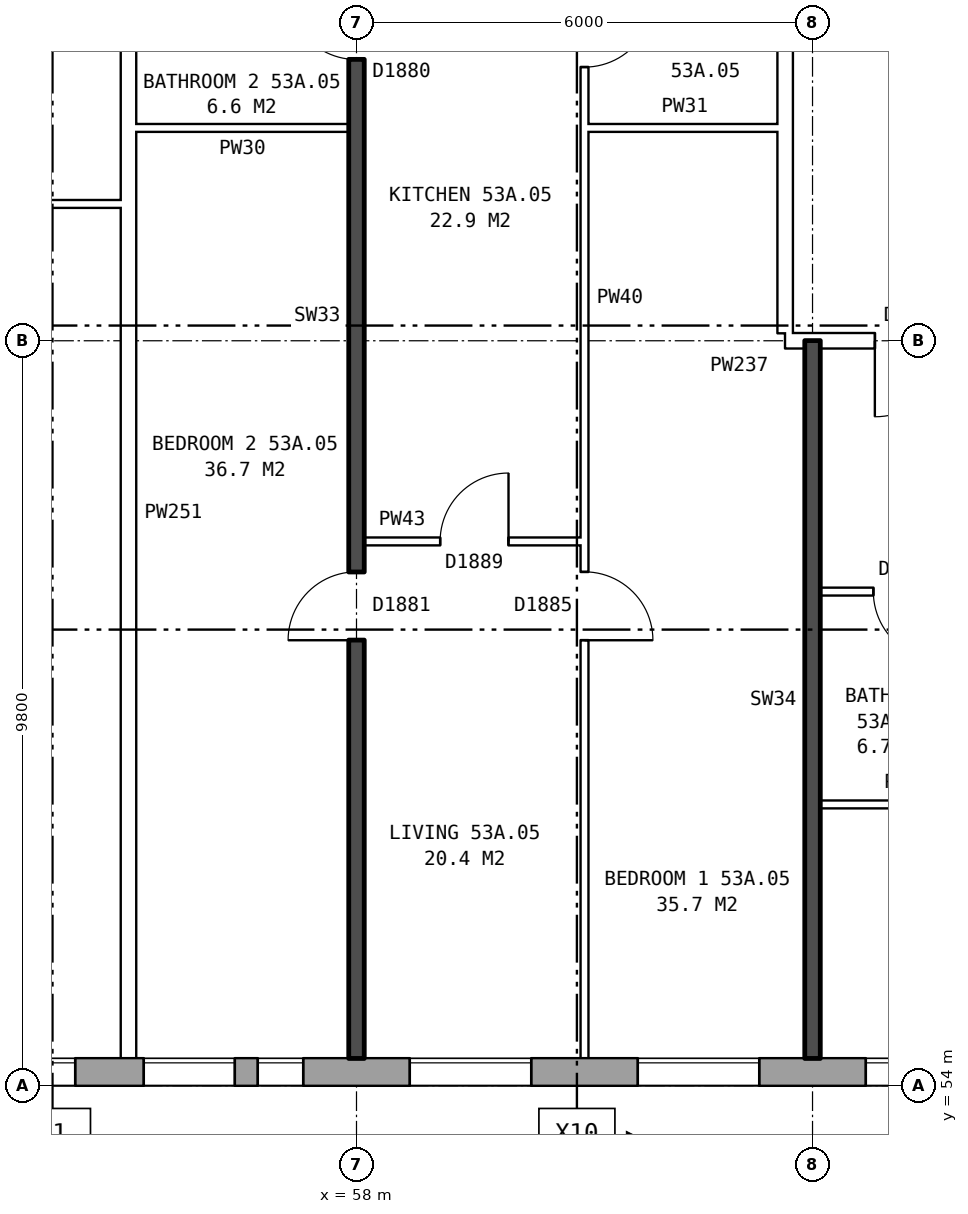
"""IFC4 building model, lengths in metres.
Left out: names, types, materials, properties, quantities, classifications, styles, units other than length and angle.
Written with IfcOpenShell. Run it as: python <this file> out.ifc"""

import sys

from ifc_helpers import new_model, si_unit, direction, frame, frame_2d, origin, place, context, subcontext, project, spatial, rectangle, extrude, element, fill, save


model = new_model("IFC4")
c1 = context("Model", 3, precision=1e-05, world=origin(), true_north=direction((0.0, 1.0)))
c2 = subcontext(c1, "Body", "Model", "MODEL_VIEW")
j1 = project(units=[si_unit("LENGTHUNIT", "METRE"), si_unit("PLANEANGLEUNIT", "RADIAN")], contexts=[c1])
p1 = place(None, origin())
s1 = spatial("IfcSite", under=j1, at=p1, CompositionType="ELEMENT")
p2 = place(p1, origin())
s2 = spatial("IfcBuilding", under=s1, at=p2, CompositionType="ELEMENT")
p3 = place(p2, frame((0.0, 0.0, 188.2)))
s3 = spatial("IfcBuildingStorey", under=s2, at=p3, CompositionType="ELEMENT", Elevation=188.2)
p4 = place(p3, frame((33.325, 54.18, 0.0), z_axis=(0.0, 0.0, 1.0), x_axis=(1.0, 0.0, 0.0)))
e1 = element("IfcWall", 1, at=p4, inside=s3, PredefinedType="STANDARD", context=c2, shape_type="SweptSolid", body=[
    extrude(rectangle(XDim=39.601, YDim=0.36, at=frame_2d((19.8, 0.0))), origin(), (0.0, 0.0, 1.0), 2.85),
])
p5 = place(p4, frame((1.375, 0.0, 0.8)))
e2 = element("IfcOpeningElement", 2, at=p5, cuts=e1, PredefinedType="OPENING", context=c2, shape_type="SweptSolid", body=[
    extrude(rectangle(XDim=1.6, YDim=1.8, at=frame_2d((0.8, 0.9))), frame((0.0, 0.19, 0.0), z_axis=(0.0, -1.0, 0.0), x_axis=(1.0, 0.0, 0.0)), (0.0, 0.0, 1.0), 0.38),
])
p6 = place(p4, frame((4.375, 0.0, 0.8)))
e3 = element("IfcOpeningElement", 3, at=p6, cuts=e1, PredefinedType="OPENING", context=c2, shape_type="SweptSolid", body=[
    extrude(rectangle(XDim=1.6, YDim=1.8, at=frame_2d((0.8, 0.9))), frame((0.0, 0.19, 0.0), z_axis=(0.0, -1.0, 0.0), x_axis=(1.0, 0.0, 0.0)), (0.0, 0.0, 1.0), 0.38),
])
p7 = place(p4, frame((7.375, 0.0, 0.8)))
e4 = element("IfcOpeningElement", 4, at=p7, cuts=e1, PredefinedType="OPENING", context=c2, shape_type="SweptSolid", body=[
    extrude(rectangle(XDim=1.6, YDim=1.8, at=frame_2d((0.8, 0.9))), frame((0.0, 0.19, 0.0), z_axis=(0.0, -1.0, 0.0), x_axis=(1.0, 0.0, 0.0)), (0.0, 0.0, 1.0), 0.38),
])
p8 = place(p4, frame((10.375, 0.0, 0.8)))
e5 = element("IfcOpeningElement", 5, at=p8, cuts=e1, PredefinedType="OPENING", context=c2, shape_type="SweptSolid", body=[
    extrude(rectangle(XDim=1.6, YDim=1.8, at=frame_2d((0.8, 0.9))), frame((0.0, 0.19, 0.0), z_axis=(0.0, -1.0, 0.0), x_axis=(1.0, 0.0, 0.0)), (0.0, 0.0, 1.0), 0.38),
])
p9 = place(p4, frame((12.875, 0.0, 0.8)))
e6 = element("IfcOpeningElement", 6, at=p9, cuts=e1, PredefinedType="OPENING", context=c2, shape_type="SweptSolid", body=[
    extrude(rectangle(XDim=1.2, YDim=1.8, at=frame_2d((0.6, 0.9))), frame((0.0, 0.19, 0.0), z_axis=(0.0, -1.0, 0.0), x_axis=(1.0, 0.0, 0.0)), (0.0, 0.0, 1.0), 0.38),
])
p10 = place(p4, frame((16.225, 0.0, 0.8)))
e7 = element("IfcOpeningElement", 7, at=p10, cuts=e1, PredefinedType="OPENING", context=c2, shape_type="SweptSolid", body=[
    extrude(rectangle(XDim=0.6, YDim=0.9, at=frame_2d((0.3, 0.45))), frame((0.0, 0.19, 0.0), z_axis=(0.0, -1.0, 0.0), x_axis=(1.0, 0.0, 0.0)), (0.0, 0.0, 1.0), 0.38),
])
p11 = place(p4, frame((19.375, 0.0, 0.8)))
e8 = element("IfcOpeningElement", 8, at=p11, cuts=e1, PredefinedType="OPENING", context=c2, shape_type="SweptSolid", body=[
    extrude(rectangle(XDim=1.6, YDim=1.8, at=frame_2d((0.8, 0.9))), frame((0.0, 0.19, 0.0), z_axis=(0.0, -1.0, 0.0), x_axis=(1.0, 0.0, 0.0)), (0.0, 0.0, 1.0), 0.38),
])
p12 = place(p4, frame((21.875, 0.0, 0.15)))
e9 = element("IfcOpeningElement", 9, at=p12, cuts=e1, PredefinedType="OPENING", context=c2, shape_type="SweptSolid", body=[
    extrude(rectangle(XDim=1.2, YDim=1.8, at=frame_2d((0.6, 0.9))), frame((0.0, 0.19, 0.0), z_axis=(0.0, -1.0, 0.0), x_axis=(1.0, 0.0, 0.0)), (0.0, 0.0, 1.0), 0.38),
])
p13 = place(p4, frame((25.375, 0.0, 0.8)))
e10 = element("IfcOpeningElement", 10, at=p13, cuts=e1, PredefinedType="OPENING", context=c2, shape_type="SweptSolid", body=[
    extrude(rectangle(XDim=1.6, YDim=1.8, at=frame_2d((0.8, 0.9))), frame((0.0, 0.19, 0.0), z_axis=(0.0, -1.0, 0.0), x_axis=(1.0, 0.0, 0.0)), (0.0, 0.0, 1.0), 0.38),
])
p14 = place(p4, frame((28.375, 0.0, 0.8)))
e11 = element("IfcOpeningElement", 11, at=p14, cuts=e1, PredefinedType="OPENING", context=c2, shape_type="SweptSolid", body=[
    extrude(rectangle(XDim=1.6, YDim=1.8, at=frame_2d((0.8, 0.9))), frame((0.0, 0.19, 0.0), z_axis=(0.0, -1.0, 0.0), x_axis=(1.0, 0.0, 0.0)), (0.0, 0.0, 1.0), 0.38),
])
p15 = place(p4, frame((31.375, 0.0, 0.8)))
e12 = element("IfcOpeningElement", 12, at=p15, cuts=e1, PredefinedType="OPENING", context=c2, shape_type="SweptSolid", body=[
    extrude(rectangle(XDim=1.6, YDim=1.8, at=frame_2d((0.8, 0.9))), frame((0.0, 0.19, 0.0), z_axis=(0.0, -1.0, 0.0), x_axis=(1.0, 0.0, 0.0)), (0.0, 0.0, 1.0), 0.38),
])
p16 = place(p4, frame((34.375, 0.0, 0.8)))
e13 = element("IfcOpeningElement", 13, at=p16, cuts=e1, PredefinedType="OPENING", context=c2, shape_type="SweptSolid", body=[
    extrude(rectangle(XDim=1.6, YDim=1.8, at=frame_2d((0.8, 0.9))), frame((0.0, 0.19, 0.0), z_axis=(0.0, -1.0, 0.0), x_axis=(1.0, 0.0, 0.0)), (0.0, 0.0, 1.0), 0.38),
])
p17 = place(p4, frame((37.375, 0.0, 0.8)))
e14 = element("IfcOpeningElement", 14, at=p17, cuts=e1, PredefinedType="OPENING", context=c2, shape_type="SweptSolid", body=[
    extrude(rectangle(XDim=1.6, YDim=1.8, at=frame_2d((0.8, 0.9))), frame((0.0, 0.19, 0.0), z_axis=(0.0, -1.0, 0.0), x_axis=(1.0, 0.0, 0.0)), (0.0, 0.0, 1.0), 0.38),
])
p18 = place(p4, frame((14.375, 0.0, 1.6)))
e15 = element("IfcOpeningElement", 15, at=p18, cuts=e1, PredefinedType="OPENING", context=c2, shape_type="SweptSolid", body=[
    extrude(rectangle(XDim=0.6, YDim=0.9, at=frame_2d((0.3, 0.45))), frame((0.0, 0.19, 0.0), z_axis=(0.0, -1.0, 0.0), x_axis=(1.0, 0.0, 0.0)), (0.0, 0.0, 1.0), 0.38),
])
p19 = place(p4, frame((17.125, 0.0, 0.8)))
e16 = element("IfcOpeningElement", 16, at=p19, cuts=e1, PredefinedType="OPENING", context=c2, shape_type="SweptSolid", body=[
    extrude(rectangle(XDim=1.2, YDim=1.8, at=frame_2d((0.6, 0.9))), frame((0.0, 0.19, 0.0), z_axis=(0.0, -1.0, 0.0), x_axis=(1.0, 0.0, 0.0)), (0.0, 0.0, 1.0), 0.38),
])
p20 = place(p4, frame((23.375, 0.0, 0.15)))
e17 = element("IfcOpeningElement", 17, at=p20, cuts=e1, PredefinedType="OPENING", context=c2, shape_type="SweptSolid", body=[
    extrude(rectangle(XDim=0.6, YDim=0.9, at=frame_2d((0.3, 0.45))), frame((0.0, 0.19, 0.0), z_axis=(0.0, -1.0, 0.0), x_axis=(1.0, 0.0, 0.0)), (0.0, 0.0, 1.0), 0.38),
])
p21 = place(p3, frame((63.64, 63.9, 0.0), z_axis=(0.0, 0.0, 1.0), x_axis=(0.0, 1.0, 0.0)))
e18 = element("IfcWall", 18, at=p21, inside=s3, PredefinedType="PARTITIONING", context=c2, shape_type="SweptSolid", body=[
    extrude(rectangle(XDim=12.2, YDim=0.2, at=frame_2d((6.1, 0.0))), origin(), (0.0, 0.0, 1.0), 2.85),
])
p22 = place(p21, frame((5.1, 0.0, 0.0)))
e19 = element("IfcOpeningElement", 19, at=p22, cuts=e18, PredefinedType="OPENING", context=c2, shape_type="SweptSolid", body=[
    extrude(rectangle(XDim=2.0, YDim=2.1, at=frame_2d((1.0, 1.05))), frame((0.0, 0.11, 0.0), z_axis=(0.0, -1.0, 0.0), x_axis=(1.0, 0.0, 0.0)), (0.0, 0.0, 1.0), 0.22),
])
p23 = place(p3, frame((64.1, 57.7, 0.0), z_axis=(0.0, 0.0, 1.0), x_axis=(1.0, 0.0, 0.0)))
e20 = element("IfcWall", 20, at=p23, inside=s3, PredefinedType="PARTITIONING", context=c2, shape_type="SweptSolid", body=[
    extrude(rectangle(XDim=2.3, YDim=0.1, at=frame_2d((1.15, 0.0))), origin(), (0.0, 0.0, 1.0), 2.85),
])
p24 = place(p3, frame((64.1, 60.5, 0.0), z_axis=(0.0, 0.0, 1.0), x_axis=(1.0, 0.0, 0.0)))
e21 = element("IfcWall", 21, at=p24, inside=s3, PredefinedType="PARTITIONING", context=c2, shape_type="SweptSolid", body=[
    extrude(rectangle(XDim=5.8, YDim=0.1, at=frame_2d((2.9, 0.0))), origin(), (0.0, 0.0, 1.0), 2.85),
])
p25 = place(p24, frame((3.6, 0.0, 0.0)))
e22 = element("IfcOpeningElement", 22, at=p25, cuts=e21, PredefinedType="OPENING", context=c2, shape_type="SweptSolid", body=[
    extrude(rectangle(XDim=0.9, YDim=2.1, at=frame_2d((0.45, 1.05))), frame((0.0, 0.06, 0.0), z_axis=(0.0, -1.0, 0.0), x_axis=(1.0, 0.0, 0.0)), (0.0, 0.0, 1.0), 0.12),
])
p26 = place(p24, frame((0.7, 0.0, 0.0)))
e23 = element("IfcOpeningElement", 23, at=p26, cuts=e21, PredefinedType="OPENING", context=c2, shape_type="SweptSolid", body=[
    extrude(rectangle(XDim=0.9, YDim=2.1, at=frame_2d((0.45, 1.05))), frame((0.0, 0.06, 0.0), z_axis=(0.0, -1.0, 0.0), x_axis=(1.0, 0.0, 0.0)), (0.0, 0.0, 1.0), 0.12),
])
p27 = place(p3, frame((58.1, 61.16, 0.0), z_axis=(0.0, 0.0, 1.0), x_axis=(1.0, 0.0, 0.0)))
e24 = element("IfcWall", 24, at=p27, inside=s3, PredefinedType="PARTITIONING", context=c2, shape_type="SweptSolid", body=[
    extrude(rectangle(XDim=2.9, YDim=0.1, at=frame_2d((1.45, 0.0))), origin(), (0.0, 0.0, 1.0), 2.85),
])
p28 = place(p27, frame((1.0, 0.0, 0.0)))
e25 = element("IfcOpeningElement", 25, at=p28, cuts=e24, PredefinedType="OPENING", context=c2, shape_type="SweptSolid", body=[
    extrude(rectangle(XDim=0.9, YDim=2.1, at=frame_2d((0.45, 1.05))), frame((0.0, 0.06, 0.0), z_axis=(0.0, -1.0, 0.0), x_axis=(1.0, 0.0, 0.0)), (0.0, 0.0, 1.0), 0.12),
])
p29 = place(p3, frame((63.64, 63.8, 0.0), z_axis=(0.0, 0.0, 1.0), x_axis=(1.0, 0.0, 0.0)))
e26 = element("IfcWall", 26, at=p29, inside=s3, PredefinedType="PARTITIONING", context=c2, shape_type="SweptSolid", body=[
    extrude(rectangle(XDim=3.0, YDim=0.2, at=frame_2d((1.5, 0.0))), origin(), (0.0, 0.0, 1.0), 2.85),
])
p30 = place(p29, frame((1.18, 0.0, 0.0)))
e27 = element("IfcOpeningElement", 27, at=p30, cuts=e26, PredefinedType="OPENING", context=c2, shape_type="SweptSolid", body=[
    extrude(rectangle(XDim=1.0, YDim=2.1, at=frame_2d((0.5, 1.05))), frame((0.0, 0.11, 0.0), z_axis=(0.0, -1.0, 0.0), x_axis=(1.0, 0.0, 0.0)), (0.0, 0.0, 1.0), 0.22),
])
for number, where, z_axis, x_axis in (
    (28, (52.1, 65.6, 0.0), (0.0, 0.0, 1.0), (1.0, 0.0, 0.0)),
    (29, (55.1, 66.6, 0.0), (0.0, 0.0, 1.0), (1.0, 0.0, 0.0)),
):
    element("IfcWall", number, at=place(p3, frame(where, z_axis=z_axis, x_axis=x_axis)), inside=s3, PredefinedType="PARTITIONING", context=c2, shape_type="SweptSolid", body=[
        extrude(rectangle(XDim=2.8, YDim=0.1, at=frame_2d((1.4, 0.0))), origin(), (0.0, 0.0, 1.0), 2.85),
    ])
p31 = place(p3, frame((61.0, 66.6, 0.0), z_axis=(0.0, 0.0, 1.0), x_axis=(1.0, 0.0, 0.0)))
e30 = element("IfcWall", 30, at=p31, inside=s3, PredefinedType="PARTITIONING", context=c2, shape_type="SweptSolid", body=[
    extrude(rectangle(XDim=2.64, YDim=0.1, at=frame_2d((1.32, 0.0))), origin(), (0.0, 0.0, 1.0), 2.85),
])
p32 = place(p3, frame((55.0, 54.36, 0.0), z_axis=(0.0, 0.0, 1.0), x_axis=(0.0, 1.0, 0.0)))
e31 = element("IfcWall", 31, at=p32, inside=s3, PredefinedType="PARTITIONING", context=c2, shape_type="SweptSolid", body=[
    extrude(rectangle(XDim=14.34, YDim=0.2, at=frame_2d((7.17, 0.0))), origin(), (0.0, 0.0, 1.0), 2.85),
])
p33 = place(p3, frame((58.0, 54.36, 0.0), z_axis=(0.0, 0.0, 1.0), x_axis=(0.0, 1.0, 0.0)))
e32 = element("IfcWall", 32, at=p33, inside=s3, PredefinedType="SOLIDWALL", context=c2, shape_type="SweptSolid", body=[
    extrude(rectangle(XDim=14.44, YDim=0.2, at=frame_2d((7.22, 0.0))), origin(), (0.0, 0.0, 1.0), 2.85),
])
p34 = place(p33, frame((5.5, 0.0, 0.0)))
e33 = element("IfcOpeningElement", 33, at=p34, cuts=e32, PredefinedType="OPENING", context=c2, shape_type="SweptSolid", body=[
    extrude(rectangle(XDim=0.9, YDim=2.1, at=frame_2d((0.45, 1.05))), frame((0.0, 0.11, 0.0), z_axis=(0.0, -1.0, 0.0), x_axis=(1.0, 0.0, 0.0)), (0.0, 0.0, 1.0), 0.22),
])
p35 = place(p33, frame((13.14, 0.0, 0.0)))
e34 = element("IfcOpeningElement", 34, at=p35, cuts=e32, PredefinedType="OPENING", context=c2, shape_type="SweptSolid", body=[
    extrude(rectangle(XDim=0.9, YDim=2.1, at=frame_2d((0.45, 1.05))), frame((0.0, 0.11, 0.0), z_axis=(0.0, -1.0, 0.0), x_axis=(1.0, 0.0, 0.0)), (0.0, 0.0, 1.0), 0.22),
])
p36 = place(p3, frame((61.0, 54.36, 0.0), z_axis=(0.0, 0.0, 1.0), x_axis=(0.0, 1.0, 0.0)))
e35 = element("IfcWall", 35, at=p36, inside=s3, PredefinedType="PARTITIONING", context=c2, shape_type="SweptSolid", body=[
    extrude(rectangle(XDim=14.34, YDim=0.1, at=frame_2d((7.17, 0.0))), origin(), (0.0, 0.0, 1.0), 2.85),
])
p37 = place(p36, frame((5.5, 0.0, 0.0)))
e36 = element("IfcOpeningElement", 36, at=p37, cuts=e35, PredefinedType="OPENING", context=c2, shape_type="SweptSolid", body=[
    extrude(rectangle(XDim=0.9, YDim=2.1, at=frame_2d((0.45, 1.05))), frame((0.0, 0.06, 0.0), z_axis=(0.0, -1.0, 0.0), x_axis=(1.0, 0.0, 0.0)), (0.0, 0.0, 1.0), 0.12),
])
p38 = place(p36, frame((13.04, 0.0, 0.0)))
e37 = element("IfcOpeningElement", 37, at=p38, cuts=e35, PredefinedType="OPENING", context=c2, shape_type="SweptSolid", body=[
    extrude(rectangle(XDim=0.9, YDim=2.1, at=frame_2d((0.45, 1.05))), frame((0.0, 0.06, 0.0), z_axis=(0.0, -1.0, 0.0), x_axis=(1.0, 0.0, 0.0)), (0.0, 0.0, 1.0), 0.12),
])
p39 = place(p3, frame((64.0, 54.36, 0.0), z_axis=(0.0, 0.0, 1.0), x_axis=(0.0, 1.0, 0.0)))
e38 = element("IfcWall", 38, at=p39, inside=s3, PredefinedType="SOLIDWALL", context=c2, shape_type="SweptSolid", body=[
    extrude(rectangle(XDim=9.44, YDim=0.2, at=frame_2d((4.72, 0.0))), origin(), (0.0, 0.0, 1.0), 2.85),
])
p40 = place(p11, origin())
e39 = element("IfcWindow", 39, at=p40, inside=s3, PartitioningType="SINGLE_PANEL", PredefinedType="WINDOW", context=c2, shape_type="SweptSolid", body=[
    extrude(rectangle(XDim=1.6, YDim=1.8, at=frame_2d((0.8, 0.9))), frame((0.0, 0.15, 0.0), z_axis=(0.0, -1.0, 0.0), x_axis=(1.0, 0.0, 0.0)), (0.0, 0.0, 1.0), 0.06),
])
fill(e8, e39)
p41 = place(p12, origin())
e40 = element("IfcWindow", 40, at=p41, inside=s3, PartitioningType="SINGLE_PANEL", PredefinedType="WINDOW", context=c2, shape_type="SweptSolid", body=[
    extrude(rectangle(XDim=1.2, YDim=1.8, at=frame_2d((0.6, 0.9))), frame((0.0, 0.15, 0.0), z_axis=(0.0, -1.0, 0.0), x_axis=(1.0, 0.0, 0.0)), (0.0, 0.0, 1.0), 0.06),
])
fill(e9, e40)
p42 = place(p13, origin())
e41 = element("IfcWindow", 41, at=p42, inside=s3, PartitioningType="SINGLE_PANEL", PredefinedType="WINDOW", context=c2, shape_type="SweptSolid", body=[
    extrude(rectangle(XDim=1.6, YDim=1.8, at=frame_2d((0.8, 0.9))), frame((0.0, 0.15, 0.0), z_axis=(0.0, -1.0, 0.0), x_axis=(1.0, 0.0, 0.0)), (0.0, 0.0, 1.0), 0.06),
])
fill(e10, e41)
p43 = place(p14, origin())
e42 = element("IfcWindow", 42, at=p43, inside=s3, PartitioningType="SINGLE_PANEL", PredefinedType="WINDOW", context=c2, shape_type="SweptSolid", body=[
    extrude(rectangle(XDim=1.6, YDim=1.8, at=frame_2d((0.8, 0.9))), frame((0.0, 0.15, 0.0), z_axis=(0.0, -1.0, 0.0), x_axis=(1.0, 0.0, 0.0)), (0.0, 0.0, 1.0), 0.06),
])
fill(e11, e42)
p44 = place(p15, origin())
e43 = element("IfcWindow", 43, at=p44, inside=s3, PartitioningType="SINGLE_PANEL", PredefinedType="WINDOW", context=c2, shape_type="SweptSolid", body=[
    extrude(rectangle(XDim=1.6, YDim=1.8, at=frame_2d((0.8, 0.9))), frame((0.0, 0.15, 0.0), z_axis=(0.0, -1.0, 0.0), x_axis=(1.0, 0.0, 0.0)), (0.0, 0.0, 1.0), 0.06),
])
fill(e12, e43)
p45 = place(p30, frame((1.0, 0.0, 0.0), z_axis=(0.0, 0.0, 1.0), x_axis=(-1.0, 0.0, 0.0)))
e44 = element("IfcDoor", 44, at=p45, inside=s3, OperationType="SINGLE_SWING_RIGHT", PredefinedType="DOOR", context=c2, shape_type="SweptSolid", body=[
    extrude(rectangle(XDim=1.0, YDim=2.1, at=frame_2d((0.5, 1.05))), frame((0.0, 0.025, 0.0), z_axis=(0.0, -1.0, 0.0), x_axis=(1.0, 0.0, 0.0)), (0.0, 0.0, 1.0), 0.05),
])
fill(e27, e44)
p46 = place(p26, frame((0.9, 0.0, 0.0), z_axis=(0.0, 0.0, 1.0), x_axis=(-1.0, 0.0, 0.0)))
e45 = element("IfcDoor", 45, at=p46, inside=s3, OperationType="SINGLE_SWING_LEFT", PredefinedType="DOOR", context=c2, shape_type="SweptSolid", body=[
    extrude(rectangle(XDim=0.9, YDim=2.1, at=frame_2d((0.45, 1.05))), frame((0.0, 0.025, 0.0), z_axis=(0.0, -1.0, 0.0), x_axis=(1.0, 0.0, 0.0)), (0.0, 0.0, 1.0), 0.05),
])
fill(e23, e45)
p47 = place(p37, frame((0.9, 0.0, 0.0), z_axis=(0.0, 0.0, 1.0), x_axis=(-1.0, 0.0, 0.0)))
e46 = element("IfcDoor", 46, at=p47, inside=s3, OperationType="SINGLE_SWING_RIGHT", PredefinedType="DOOR", context=c2, shape_type="SweptSolid", body=[
    extrude(rectangle(XDim=0.9, YDim=2.1, at=frame_2d((0.45, 1.05))), frame((0.0, 0.025, 0.0), z_axis=(0.0, -1.0, 0.0), x_axis=(1.0, 0.0, 0.0)), (0.0, 0.0, 1.0), 0.05),
])
fill(e36, e46)
p48 = place(p34, origin())
e47 = element("IfcDoor", 47, at=p48, inside=s3, OperationType="SINGLE_SWING_LEFT", PredefinedType="DOOR", context=c2, shape_type="SweptSolid", body=[
    extrude(rectangle(XDim=0.9, YDim=2.1, at=frame_2d((0.45, 1.05))), frame((0.0, 0.025, 0.0), z_axis=(0.0, -1.0, 0.0), x_axis=(1.0, 0.0, 0.0)), (0.0, 0.0, 1.0), 0.05),
])
fill(e33, e47)
p49 = place(p28, origin())
e48 = element("IfcDoor", 48, at=p49, inside=s3, OperationType="SINGLE_SWING_RIGHT", PredefinedType="DOOR", context=c2, shape_type="SweptSolid", body=[
    extrude(rectangle(XDim=0.9, YDim=2.1, at=frame_2d((0.45, 1.05))), frame((0.0, 0.025, 0.0), z_axis=(0.0, -1.0, 0.0), x_axis=(1.0, 0.0, 0.0)), (0.0, 0.0, 1.0), 0.05),
])
fill(e25, e48)
p50 = place(p38, frame((0.9, 0.0, 0.0), z_axis=(0.0, 0.0, 1.0), x_axis=(-1.0, 0.0, 0.0)))
e49 = element("IfcDoor", 49, at=p50, inside=s3, OperationType="SINGLE_SWING_LEFT", PredefinedType="DOOR", context=c2, shape_type="SweptSolid", body=[
    extrude(rectangle(XDim=0.9, YDim=2.1, at=frame_2d((0.45, 1.05))), frame((0.0, 0.025, 0.0), z_axis=(0.0, -1.0, 0.0), x_axis=(1.0, 0.0, 0.0)), (0.0, 0.0, 1.0), 0.05),
])
fill(e37, e49)
p51 = place(p35, origin())
e50 = element("IfcDoor", 50, at=p51, inside=s3, OperationType="SINGLE_SWING_RIGHT", PredefinedType="DOOR", context=c2, shape_type="SweptSolid", body=[
    extrude(rectangle(XDim=0.9, YDim=2.1, at=frame_2d((0.45, 1.05))), frame((0.0, 0.025, 0.0), z_axis=(0.0, -1.0, 0.0), x_axis=(1.0, 0.0, 0.0)), (0.0, 0.0, 1.0), 0.05),
])
fill(e34, e50)
p52 = place(p20, origin())
e51 = element("IfcWindow", 51, at=p52, inside=s3, PartitioningType="SINGLE_PANEL", PredefinedType="WINDOW", context=c2, shape_type="SweptSolid", body=[
    extrude(rectangle(XDim=0.6, YDim=0.9, at=frame_2d((0.3, 0.45))), frame((0.0, 0.15, 0.0), z_axis=(0.0, -1.0, 0.0), x_axis=(1.0, 0.0, 0.0)), (0.0, 0.0, 1.0), 0.06),
])
fill(e17, e51)
save(model, sys.argv[1])
